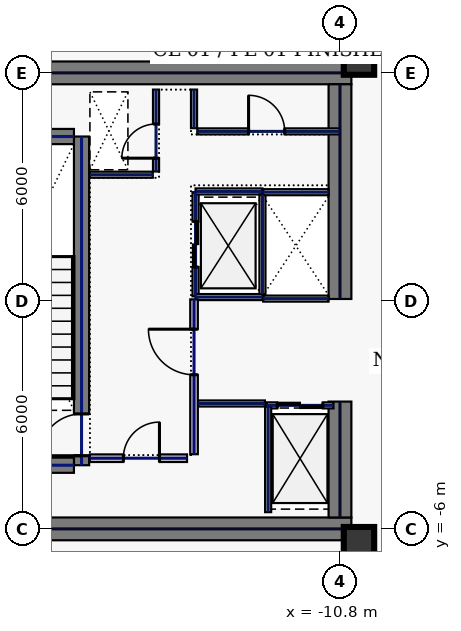
"""IFC4 building model, lengths in metres.
Left out: names, types, materials, properties, quantities, classifications, styles, units other than length and angle.
Written with IfcOpenShell. Run it as: python <this file> out.ifc"""

import sys

from ifc_helpers import new_model, si_unit, direction, frame, frame_2d, origin, origin_2d, place, context, subcontext, project, spatial, rectangle, hollow_rectangle, extrude, element, fill, save


model = new_model("IFC4")
c1 = context("Model", 3, precision=1e-05, world=origin(), true_north=direction((0.0, 1.0)))
c2 = subcontext(c1, "Body", "Model", "MODEL_VIEW")
j1 = project(units=[si_unit("LENGTHUNIT", "METRE"), si_unit("PLANEANGLEUNIT", "RADIAN")], contexts=[c1])
p1 = place(None, origin())
s1 = spatial("IfcSite", under=j1, at=p1, CompositionType="ELEMENT")
p2 = place(p1, origin())
s2 = spatial("IfcBuilding", under=s1, at=p2, CompositionType="ELEMENT")
p3 = place(p2, frame((0.0, 0.0, 226.2)))
s3 = spatial("IfcBuildingStorey", under=s2, at=p3, CompositionType="ELEMENT", Elevation=226.2)
for number, where, z_axis, x_axis in (
    (1, (-22.0, 6.0, 0.0), (0.0, 0.0, 1.0), (1.0, 0.0, 0.0)),
    (2, (-22.0, -6.0, 0.0), (0.0, 0.0, 1.0), (1.0, 0.0, 0.0)),
):
    element("IfcWall", number, at=place(p3, frame(where, z_axis=z_axis, x_axis=x_axis)), inside=s3, PredefinedType="SHEAR", context=c2, shape_type="SweptSolid", body=[
        extrude(rectangle(XDim=11.5, YDim=0.6, at=frame_2d((5.75, 0.0))), origin(), (0.0, 0.0, 1.0), 3.74),
    ])
p4 = place(p3, frame((-10.8, -5.7, 0.0), z_axis=(0.0, 0.0, 1.0), x_axis=(0.0, 1.0, 0.0)))
e3 = element("IfcWall", 3, at=p4, inside=s3, PredefinedType="SHEAR", context=c2, shape_type="SweptSolid", body=[
    extrude(rectangle(XDim=3.05, YDim=0.6, at=frame_2d((1.525, 0.0))), origin(), (0.0, 0.0, 1.0), 3.74),
])
p5 = place(p3, frame((-10.8, 0.05, 0.0), z_axis=(0.0, 0.0, 1.0), x_axis=(0.0, 1.0, 0.0)))
e4 = element("IfcWall", 4, at=p5, inside=s3, PredefinedType="SHEAR", context=c2, shape_type="SweptSolid", body=[
    extrude(rectangle(XDim=5.65, YDim=0.6, at=frame_2d((2.825, 0.0))), origin(), (0.0, 0.0, 1.0), 3.74),
])
p6 = place(p3, frame((-17.6, -4.325, 0.0), z_axis=(0.0, 0.0, 1.0), x_axis=(0.0, 1.0, 0.0)))
e5 = element("IfcWall", 5, at=p6, inside=s3, PredefinedType="SHEAR", context=c2, shape_type="SweptSolid", body=[
    extrude(rectangle(XDim=8.65, YDim=0.4, at=frame_2d((4.325, 0.0))), origin(), (0.0, 0.0, 1.0), 3.74),
])
p7 = place(p6, frame((0.25, 0.0, 0.0)))
e6 = element("IfcOpeningElement", 6, at=p7, cuts=e5, PredefinedType="OPENING", context=c2, shape_type="SweptSolid", body=[
    extrude(rectangle(XDim=1.1, YDim=2.2, at=frame_2d((0.55, 1.1))), frame((0.0, 0.21, 0.0), z_axis=(0.0, -1.0, 0.0), x_axis=(1.0, 0.0, 0.0)), (0.0, 0.0, 1.0), 0.42),
])
for number, where, z_axis, x_axis in (
    (7, (-21.2, -4.325, 0.0), (0.0, 0.0, 1.0), (1.0, 0.0, 0.0)),
    (8, (-21.2, 4.325, 0.0), (0.0, 0.0, 1.0), (1.0, 0.0, 0.0)),
):
    element("IfcWall", number, at=place(p3, frame(where, z_axis=z_axis, x_axis=x_axis)), inside=s3, PredefinedType="SHEAR", context=c2, shape_type="SweptSolid", body=[
        extrude(rectangle(XDim=3.4, YDim=0.4, at=frame_2d((1.7, 0.0))), origin(), (0.0, 0.0, 1.0), 3.74),
    ])
for number, where, z_axis, x_axis in (
    (9, (-10.3, -6.35, 0.0), (0.0, 0.0, 1.0), (1.0, 0.0, 0.0)),
    (10, (-10.3, 6.35, 0.0), (0.0, 0.0, 1.0), (1.0, 0.0, 0.0)),
):
    element("IfcColumn", number, at=place(p3, frame(where, z_axis=z_axis, x_axis=x_axis)), inside=s3, PredefinedType="COLUMN", context=c2, shape_type="SweptSolid", body=[
        extrude(hollow_rectangle(XDim=0.8, YDim=0.8, WallThickness=0.036, at=origin_2d()), origin(), (0.0, 0.0, 1.0), 3.74),
    ])
p8 = place(p3, frame((-14.6, 0.12, 0.0), z_axis=(0.0, 0.0, 1.0), x_axis=(0.0, 1.0, 0.0)))
e11 = element("IfcWall", 11, at=p8, inside=s3, PredefinedType="PARTITIONING", context=c2, shape_type="SweptSolid", body=[
    extrude(rectangle(XDim=2.74, YDim=0.16, at=frame_2d((1.37, 0.0))), origin(), (0.0, 0.0, 1.0), 3.74),
])
p9 = place(p8, frame((0.77, 0.0, 0.0)))
e12 = element("IfcOpeningElement", 12, at=p9, cuts=e11, PredefinedType="OPENING", context=c2, shape_type="SweptSolid", body=[
    extrude(rectangle(XDim=1.2, YDim=2.2, at=frame_2d((0.6, 1.1))), frame((0.0, 0.09, 0.0), z_axis=(0.0, -1.0, 0.0), x_axis=(1.0, 0.0, 0.0)), (0.0, 0.0, 1.0), 0.18),
])
for number, where, z_axis, x_axis in (
    (13, (-14.6, 0.1, 0.0), (0.0, 0.0, 1.0), (1.0, 0.0, 0.0)),
    (14, (-14.6, 2.88, 0.0), (0.0, 0.0, 1.0), (1.0, 0.0, 0.0)),
):
    element("IfcWall", number, at=place(p3, frame(where, z_axis=z_axis, x_axis=x_axis)), inside=s3, PredefinedType="PARTITIONING", context=c2, shape_type="SweptSolid", body=[
        extrude(rectangle(XDim=1.76, YDim=0.16, at=frame_2d((0.88, 0.0))), origin(), (0.0, 0.0, 1.0), 3.74),
    ])
p10 = place(p3, frame((-12.84, 0.18, 0.0), z_axis=(0.0, 0.0, 1.0), x_axis=(0.0, 1.0, 0.0)))
e15 = element("IfcWall", 15, at=p10, inside=s3, PredefinedType="PARTITIONING", context=c2, shape_type="SweptSolid", body=[
    extrude(rectangle(XDim=2.62, YDim=0.16, at=frame_2d((1.31, 0.0))), origin(), (0.0, 0.0, 1.0), 3.74),
])
p11 = place(p3, frame((-12.73, -2.75, 0.0), z_axis=(0.0, 0.0, 1.0), x_axis=(1.0, 0.0, 0.0)))
e16 = element("IfcWall", 16, at=p11, inside=s3, PredefinedType="PARTITIONING", context=c2, shape_type="SweptSolid", body=[
    extrude(rectangle(XDim=1.76, YDim=0.16, at=frame_2d((0.88, 0.0))), origin(), (0.0, 0.0, 1.0), 3.74),
])
p12 = place(p11, frame((0.28, 0.0, 0.0)))
e17 = element("IfcOpeningElement", 17, at=p12, cuts=e16, PredefinedType="OPENING", context=c2, shape_type="SweptSolid", body=[
    extrude(rectangle(XDim=1.2, YDim=2.2, at=frame_2d((0.6, 1.1))), frame((0.0, 0.09, 0.0), z_axis=(0.0, -1.0, 0.0), x_axis=(1.0, 0.0, 0.0)), (0.0, 0.0, 1.0), 0.18),
])
for number, where, z_axis, x_axis in (
    (18, (-12.82, 0.06, 0.0), (0.0, 0.0, 1.0), (1.0, 0.0, 0.0)),
    (19, (-12.82, 2.86, 0.0), (0.0, 0.0, 1.0), (1.0, 0.0, 0.0)),
):
    element("IfcWall", number, at=place(p3, frame(where, z_axis=z_axis, x_axis=x_axis)), inside=s3, PredefinedType="PARTITIONING", context=c2, shape_type="SweptSolid", body=[
        extrude(rectangle(XDim=1.72, YDim=0.16, at=frame_2d((0.86, 0.0))), origin(), (0.0, 0.0, 1.0), 3.74),
    ])
p13 = place(p3, frame((-15.64, 3.405, 0.0), z_axis=(0.0, 0.0, 1.0), x_axis=(0.0, 1.0, 0.0)))
e20 = element("IfcWall", 20, at=p13, inside=s3, PredefinedType="PARTITIONING", context=c2, shape_type="SweptSolid", body=[
    extrude(rectangle(XDim=2.155, YDim=0.16, at=frame_2d((1.078, 0.0))), origin(), (0.0, 0.0, 1.0), 3.74),
])
p14 = place(p13, frame((0.35, 0.0, 0.0)))
e21 = element("IfcOpeningElement", 21, at=p14, cuts=e20, PredefinedType="OPENING", context=c2, shape_type="SweptSolid", body=[
    extrude(rectangle(XDim=0.9, YDim=2.2, at=frame_2d((0.45, 1.1))), frame((0.0, 0.09, 0.0), z_axis=(0.0, -1.0, 0.0), x_axis=(1.0, 0.0, 0.0)), (0.0, 0.0, 1.0), 0.18),
])
p15 = place(p3, frame((-17.38, 3.32, 0.0), z_axis=(0.0, 0.0, 1.0), x_axis=(1.0, 0.0, 0.0)))
e22 = element("IfcWall", 22, at=p15, inside=s3, PredefinedType="PARTITIONING", context=c2, shape_type="SweptSolid", body=[
    extrude(rectangle(XDim=1.655, YDim=0.16, at=frame_2d((0.827, 0.0))), origin(), (0.0, 0.0, 1.0), 3.74),
])
p16 = place(p3, frame((-17.38, -4.14, 0.0), z_axis=(0.0, 0.0, 1.0), x_axis=(1.0, 0.0, 0.0)))
e23 = element("IfcWall", 23, at=p16, inside=s3, PredefinedType="SOLIDWALL", context=c2, shape_type="SweptSolid", body=[
    extrude(rectangle(XDim=2.555, YDim=0.2, at=frame_2d((1.277, 0.0))), origin(), (0.0, 0.0, 1.0), 3.74),
])
p17 = place(p16, frame((0.88, 0.0, 0.0)))
e24 = element("IfcOpeningElement", 24, at=p17, cuts=e23, PredefinedType="OPENING", context=c2, shape_type="SweptSolid", body=[
    extrude(rectangle(XDim=0.95, YDim=2.2, at=frame_2d((0.475, 1.1))), frame((0.0, 0.11, 0.0), z_axis=(0.0, -1.0, 0.0), x_axis=(1.0, 0.0, 0.0)), (0.0, 0.0, 1.0), 0.22),
])
p18 = place(p3, frame((-14.535, -2.7, 0.0), z_axis=(0.0, 0.0, 1.0), x_axis=(1.0, 0.0, 0.0)))
e25 = element("IfcWall", 25, at=p18, inside=s3, PredefinedType="PARTITIONING", context=c2, shape_type="SweptSolid", body=[
    extrude(rectangle(XDim=1.76, YDim=0.16, at=frame_2d((0.88, 0.0))), origin(), (0.0, 0.0, 1.0), 3.74),
])
p19 = place(p3, frame((-12.69, -5.56, 0.0), z_axis=(0.0, 0.0, 1.0), x_axis=(0.0, 1.0, 0.0)))
e26 = element("IfcWall", 26, at=p19, inside=s3, PredefinedType="PARTITIONING", context=c2, shape_type="SweptSolid", body=[
    extrude(rectangle(XDim=2.775, YDim=0.16, at=frame_2d((1.388, 0.0))), origin(), (0.0, 0.0, 1.0), 3.74),
])
p20 = place(p3, frame((-14.555, 4.46, 0.0), z_axis=(0.0, 0.0, 1.0), x_axis=(1.0, 0.0, 0.0)))
e27 = element("IfcWall", 27, at=p20, inside=s3, PredefinedType="PARTITIONING", context=c2, shape_type="SweptSolid", body=[
    extrude(rectangle(XDim=3.755, YDim=0.16, at=frame_2d((1.877, 0.0))), origin(), (0.0, 0.0, 1.0), 3.74),
])
p21 = place(p20, frame((1.35, 0.0, 0.0)))
e28 = element("IfcOpeningElement", 28, at=p21, cuts=e27, PredefinedType="OPENING", context=c2, shape_type="SweptSolid", body=[
    extrude(rectangle(XDim=0.95, YDim=2.2, at=frame_2d((0.475, 1.1))), frame((0.0, 0.09, 0.0), z_axis=(0.0, -1.0, 0.0), x_axis=(1.0, 0.0, 0.0)), (0.0, 0.0, 1.0), 0.18),
])
p22 = place(p3, frame((-14.64, 4.545, 0.0), z_axis=(0.0, 0.0, 1.0), x_axis=(0.0, 1.0, 0.0)))
e29 = element("IfcWall", 29, at=p22, inside=s3, PredefinedType="PARTITIONING", context=c2, shape_type="SweptSolid", body=[
    extrude(rectangle(XDim=1.015, YDim=0.16, at=frame_2d((0.508, 0.0))), origin(), (0.0, 0.0, 1.0), 3.74),
])
p23 = place(p3, frame((-14.64, -4.035, 0.0), z_axis=(0.0, 0.0, 1.0), x_axis=(0.0, 1.0, 0.0)))
e30 = element("IfcWall", 30, at=p23, inside=s3, PredefinedType="SOLIDWALL", context=c2, shape_type="SweptSolid", body=[
    extrude(rectangle(XDim=4.075, YDim=0.2, at=frame_2d((2.038, 0.0))), origin(), (0.0, 0.0, 1.0), 3.74),
])
p24 = place(p23, frame((2.09, 0.0, 0.0)))
e31 = element("IfcOpeningElement", 31, at=p24, cuts=e30, PredefinedType="OPENING", context=c2, shape_type="SweptSolid", body=[
    extrude(rectangle(XDim=1.2, YDim=2.2, at=frame_2d((0.6, 1.1))), frame((0.0, 0.11, 0.0), z_axis=(0.0, -1.0, 0.0), x_axis=(1.0, 0.0, 0.0)), (0.0, 0.0, 1.0), 0.22),
])
p25 = place(p3, frame((-10.63, -7.335, 0.0), z_axis=(0.0, 0.0, 1.0), x_axis=(0.0, 1.0, 0.0)))
e32 = element("IfcWall", 32, at=p25, inside=s3, PredefinedType="PARTITIONING", context=c2, shape_type="SweptSolid", body=[
    extrude(rectangle(XDim=0.915, YDim=0.16, at=frame_2d((0.458, 0.0))), origin(), (0.0, 0.0, 1.0), 2.135),
])
p26 = place(p3, frame((-10.63, 6.42, 0.0), z_axis=(0.0, 0.0, 1.0), x_axis=(0.0, 1.0, 0.0)))
e33 = element("IfcWall", 33, at=p26, inside=s3, PredefinedType="PARTITIONING", context=c2, shape_type="SweptSolid", body=[
    extrude(rectangle(XDim=1.015, YDim=0.16, at=frame_2d((0.508, 0.0))), origin(), (0.0, 0.0, 1.0), 3.74),
])
p27 = place(p7, origin())
e34 = element("IfcDoor", 34, at=p27, inside=s3, OperationType="SINGLE_SWING_LEFT", PredefinedType="DOOR", context=c2, shape_type="SweptSolid", body=[
    extrude(rectangle(XDim=1.1, YDim=2.2, at=frame_2d((0.55, 1.1))), frame((0.0, 0.025, 0.0), z_axis=(0.0, -1.0, 0.0), x_axis=(1.0, 0.0, 0.0)), (0.0, 0.0, 1.0), 0.05),
])
fill(e6, e34)
p28 = place(p9, origin())
e35 = element("IfcDoor", 35, at=p28, inside=s3, OperationType="SLIDING_TO_LEFT", PredefinedType="DOOR", context=c2, shape_type="SweptSolid", body=[
    extrude(rectangle(XDim=1.2, YDim=2.2, at=frame_2d((0.6, 1.1))), frame((0.0, 0.025, 0.0), z_axis=(0.0, -1.0, 0.0), x_axis=(1.0, 0.0, 0.0)), (0.0, 0.0, 1.0), 0.05),
])
fill(e12, e35)
p29 = place(p12, origin())
e36 = element("IfcDoor", 36, at=p29, inside=s3, OperationType="SLIDING_TO_LEFT", PredefinedType="DOOR", context=c2, shape_type="SweptSolid", body=[
    extrude(rectangle(XDim=1.2, YDim=2.2, at=frame_2d((0.6, 1.1))), frame((0.0, 0.025, 0.0), z_axis=(0.0, -1.0, 0.0), x_axis=(1.0, 0.0, 0.0)), (0.0, 0.0, 1.0), 0.05),
])
fill(e17, e36)
p30 = place(p14, origin())
e37 = element("IfcDoor", 37, at=p30, inside=s3, OperationType="SINGLE_SWING_LEFT", PredefinedType="DOOR", context=c2, shape_type="SweptSolid", body=[
    extrude(rectangle(XDim=0.9, YDim=2.2, at=frame_2d((0.45, 1.1))), frame((0.0, 0.025, 0.0), z_axis=(0.0, -1.0, 0.0), x_axis=(1.0, 0.0, 0.0)), (0.0, 0.0, 1.0), 0.05),
])
fill(e21, e37)
p31 = place(p17, origin())
e38 = element("IfcDoor", 38, at=p31, inside=s3, OperationType="SINGLE_SWING_RIGHT", PredefinedType="DOOR", context=c2, shape_type="SweptSolid", body=[
    extrude(rectangle(XDim=0.95, YDim=2.2, at=frame_2d((0.475, 1.1))), frame((0.0, 0.025, 0.0), z_axis=(0.0, -1.0, 0.0), x_axis=(1.0, 0.0, 0.0)), (0.0, 0.0, 1.0), 0.05),
])
fill(e24, e38)
p32 = place(p21, origin())
e39 = element("IfcDoor", 39, at=p32, inside=s3, OperationType="SINGLE_SWING_LEFT", PredefinedType="DOOR", context=c2, shape_type="SweptSolid", body=[
    extrude(rectangle(XDim=0.95, YDim=2.2, at=frame_2d((0.475, 1.1))), frame((0.0, 0.025, 0.0), z_axis=(0.0, -1.0, 0.0), x_axis=(1.0, 0.0, 0.0)), (0.0, 0.0, 1.0), 0.05),
])
fill(e28, e39)
p33 = place(p24, origin())
e40 = element("IfcDoor", 40, at=p33, inside=s3, OperationType="SINGLE_SWING_RIGHT", PredefinedType="DOOR", context=c2, shape_type="SweptSolid", body=[
    extrude(rectangle(XDim=1.2, YDim=2.2, at=frame_2d((0.6, 1.1))), frame((0.0, 0.025, 0.0), z_axis=(0.0, -1.0, 0.0), x_axis=(1.0, 0.0, 0.0)), (0.0, 0.0, 1.0), 0.05),
])
fill(e31, e40)
save(model, sys.argv[1])
